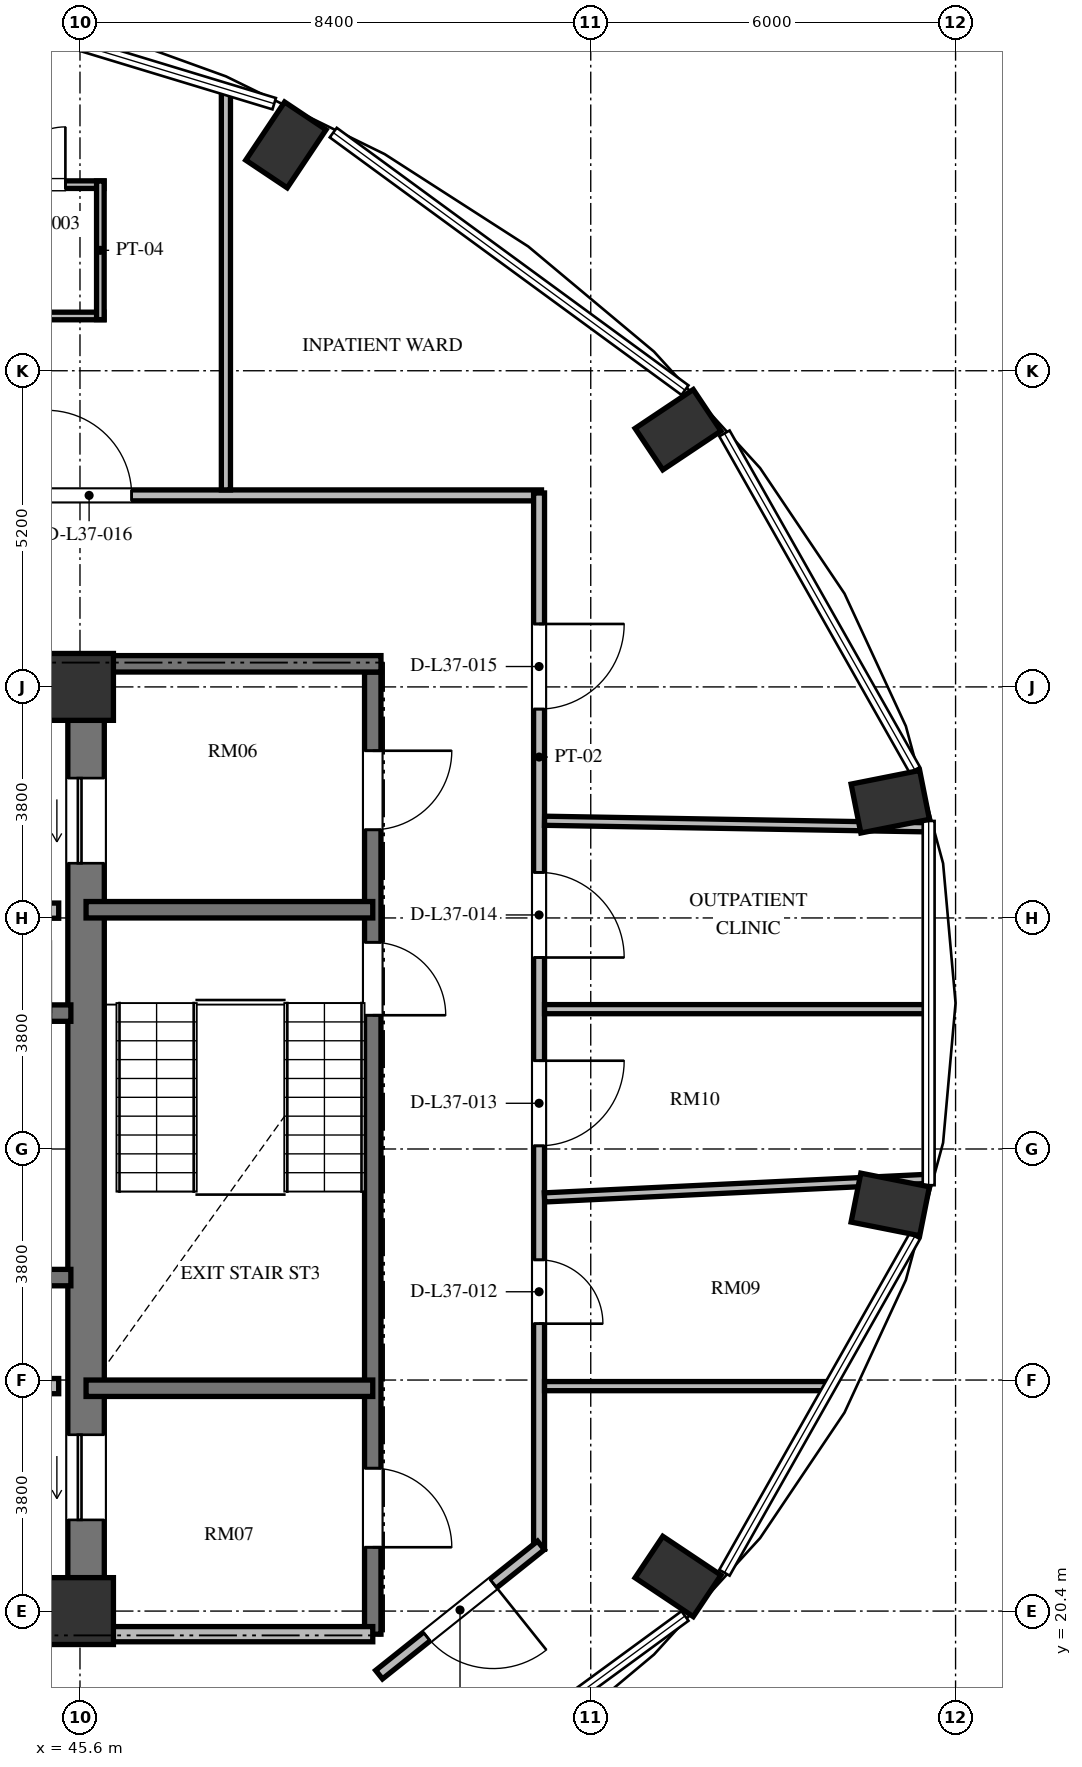
"""IFC4 building model, lengths in metres.
Left out: names, types, materials, properties, quantities, classifications, styles, units other than length and angle.
Written with IfcOpenShell. Run it as: python <this file> out.ifc"""

import sys

from ifc_helpers import new_model, si_unit, direction, frame, frame_2d, origin, origin_2d, place, context, subcontext, project, spatial, rectangle, extrude, element, fill, save


model = new_model("IFC4")
c1 = context("Model", 3, precision=1e-05, world=origin(), true_north=direction((0.0, 1.0)))
c2 = subcontext(c1, "Body", "Model", "MODEL_VIEW")
j1 = project(units=[si_unit("LENGTHUNIT", "METRE"), si_unit("PLANEANGLEUNIT", "RADIAN")], contexts=[c1])
p1 = place(None, origin())
s1 = spatial("IfcSite", under=j1, at=p1, CompositionType="ELEMENT")
p2 = place(p1, origin())
s2 = spatial("IfcBuilding", under=s1, at=p2, CompositionType="ELEMENT")
p3 = place(p2, frame((0.0, 0.0, 145.584)))
s3 = spatial("IfcBuildingStorey", under=s2, at=p3, CompositionType="ELEMENT", Elevation=145.584)
for number, where, z_axis, x_axis in (
    (1, (55.436, 20.969, 0.0), (0.0, 0.0, 1.0), (0.831, -0.556, 0.0)),
    (2, (58.926, 27.088, 0.0), (0.0, 0.0, 1.0), (0.981, -0.195, 0.0)),
    (3, (58.926, 33.712, 0.0), (0.0, 0.0, 1.0), (0.981, 0.195, 0.0)),
    (4, (55.436, 39.831, 0.0), (0.0, 0.0, 1.0), (0.831, 0.556, 0.0)),
    (5, (48.987, 44.514, 0.0), (0.0, 0.0, 1.0), (0.556, 0.831, 0.0)),
):
    element("IfcColumn", number, at=place(p3, frame(where, z_axis=z_axis, x_axis=x_axis)), inside=s3, PredefinedType="COLUMN", context=c2, shape_type="SweptSolid", body=[
        extrude(rectangle(XDim=1.15, YDim=0.82, at=origin_2d()), origin(), (0.0, 0.0, 1.0), 3.648),
    ])
for number, where, z_axis, x_axis in (
    (6, (45.6, 20.4, 0.0), (0.0, 0.0, 1.0), (1.0, 0.0, 0.0)),
    (7, (45.6, 35.6, 0.0), (0.0, 0.0, 1.0), (1.0, 0.0, 0.0)),
):
    element("IfcColumn", number, at=place(p3, frame(where, z_axis=z_axis, x_axis=x_axis)), inside=s3, PredefinedType="COLUMN", context=c2, shape_type="SweptSolid", body=[
        extrude(rectangle(XDim=1.1, YDim=1.1, at=origin_2d()), origin(), (0.0, 0.0, 1.0), 3.648),
    ])
p4 = place(p3, frame((45.7, 20.95, 0.0), z_axis=(0.0, 0.0, 1.0), x_axis=(0.0, 1.0, 0.0)))
e8 = element("IfcWall", 8, at=p4, inside=s3, PredefinedType="SHEAR", context=c2, shape_type="SweptSolid", body=[
    extrude(rectangle(XDim=14.1, YDim=0.6, at=frame_2d((7.05, 0.0))), origin(), (0.0, 0.0, 1.0), 3.648),
])
p5 = place(p4, frame((11.75, 0.0, 0.0)))
e9 = element("IfcOpeningElement", 9, at=p5, cuts=e8, PredefinedType="OPENING", context=c2, shape_type="SweptSolid", body=[
    extrude(rectangle(XDim=1.4, YDim=2.3, at=frame_2d((0.7, 1.15))), frame((0.0, 0.31, 0.0), z_axis=(0.0, -1.0, 0.0), x_axis=(1.0, 0.0, 0.0)), (0.0, 0.0, 1.0), 0.62),
])
p6 = place(p4, frame((0.95, 0.0, 0.0)))
e10 = element("IfcOpeningElement", 10, at=p6, cuts=e8, PredefinedType="OPENING", context=c2, shape_type="SweptSolid", body=[
    extrude(rectangle(XDim=1.4, YDim=2.3, at=frame_2d((0.7, 1.15))), frame((0.0, 0.31, 0.0), z_axis=(0.0, -1.0, 0.0), x_axis=(1.0, 0.0, 0.0)), (0.0, 0.0, 1.0), 0.62),
])
p7 = place(p3, frame((37.465, 30.235, 0.0), z_axis=(0.0, 0.0, 1.0), x_axis=(1.0, 0.0, 0.0)))
e11 = element("IfcWall", 11, at=p7, inside=s3, PredefinedType="SHEAR", context=c2, shape_type="SweptSolid", body=[
    extrude(rectangle(XDim=7.985, YDim=0.27, at=frame_2d((3.992, 0.0))), origin(), (0.0, 0.0, 1.0), 3.648),
])
p8 = place(p7, frame((6.455, 0.0, 0.0)))
e12 = element("IfcOpeningElement", 12, at=p8, cuts=e11, PredefinedType="OPENING", context=c2, shape_type="SweptSolid", body=[
    extrude(rectangle(XDim=1.2, YDim=2.15, at=frame_2d((0.6, 1.075))), frame((0.0, 0.145, 0.0), z_axis=(0.0, -1.0, 0.0), x_axis=(1.0, 0.0, 0.0)), (0.0, 0.0, 1.0), 0.29),
])
p9 = place(p3, frame((37.465, 25.885, 0.0), z_axis=(0.0, 0.0, 1.0), x_axis=(1.0, 0.0, 0.0)))
e13 = element("IfcWall", 13, at=p9, inside=s3, PredefinedType="SHEAR", context=c2, shape_type="SweptSolid", body=[
    extrude(rectangle(XDim=7.985, YDim=0.27, at=frame_2d((3.992, 0.0))), origin(), (0.0, 0.0, 1.0), 3.648),
])
for number, where, z_axis, x_axis in (
    (14, (42.95, 31.92, 0.0), (0.0, 0.0, 1.0), (1.0, 0.0, 0.0)),
    (15, (42.95, 24.1, 0.0), (0.0, 0.0, 1.0), (1.0, 0.0, 0.0)),
):
    element("IfcWall", number, at=place(p3, frame(where, z_axis=z_axis, x_axis=x_axis)), inside=s3, PredefinedType="SOLIDWALL", context=c2, shape_type="SweptSolid", body=[
        extrude(rectangle(XDim=2.3, YDim=0.25, at=frame_2d((1.15, 0.0))), origin(), (0.0, 0.0, 1.0), 3.428),
    ])
p10 = place(p3, frame((50.415, 35.845, 0.0), z_axis=(0.0, 0.0, 1.0), x_axis=(0.0, -1.0, 0.0)))
e16 = element("IfcWall", 16, at=p10, inside=s3, PredefinedType="SHEAR", context=c2, shape_type="SweptSolid", body=[
    extrude(rectangle(XDim=15.825, YDim=0.27, at=frame_2d((7.913, 0.0))), origin(), (0.0, 0.0, 1.0), 3.648),
])
p11 = place(p10, frame((4.445, 0.0, 0.0)))
e17 = element("IfcOpeningElement", 17, at=p11, cuts=e16, PredefinedType="OPENING", context=c2, shape_type="SweptSolid", body=[
    extrude(rectangle(XDim=1.2, YDim=2.15, at=frame_2d((0.6, 1.075))), frame((0.0, 0.145, 0.0), z_axis=(0.0, -1.0, 0.0), x_axis=(1.0, 0.0, 0.0)), (0.0, 0.0, 1.0), 0.29),
])
p12 = place(p10, frame((1.295, 0.0, 0.0)))
e18 = element("IfcOpeningElement", 18, at=p12, cuts=e16, PredefinedType="OPENING", context=c2, shape_type="SweptSolid", body=[
    extrude(rectangle(XDim=1.3, YDim=2.2, at=frame_2d((0.65, 1.1))), frame((0.0, 0.145, 0.0), z_axis=(0.0, -1.0, 0.0), x_axis=(1.0, 0.0, 0.0)), (0.0, 0.0, 1.0), 0.29),
])
p13 = place(p10, frame((13.095, 0.0, 0.0)))
e19 = element("IfcOpeningElement", 19, at=p13, cuts=e16, PredefinedType="OPENING", context=c2, shape_type="SweptSolid", body=[
    extrude(rectangle(XDim=1.3, YDim=2.2, at=frame_2d((0.65, 1.1))), frame((0.0, 0.145, 0.0), z_axis=(0.0, -1.0, 0.0), x_axis=(1.0, 0.0, 0.0)), (0.0, 0.0, 1.0), 0.29),
])
p14 = place(p3, frame((46.0, 35.98, 0.0), z_axis=(0.0, 0.0, 1.0), x_axis=(1.0, 0.0, 0.0)))
e20 = element("IfcWall", 20, at=p14, inside=s3, PredefinedType="SHEAR", context=c2, shape_type="SweptSolid", body=[
    extrude(rectangle(XDim=4.55, YDim=0.27, at=frame_2d((2.275, 0.0))), origin(), (0.0, 0.0, 1.0), 3.648),
])
for number, where, z_axis, x_axis in (
    (21, (45.7, 31.935, 0.0), (0.0, 0.0, 1.0), (1.0, 0.0, 0.0)),
    (22, (45.7, 24.065, 0.0), (0.0, 0.0, 1.0), (1.0, 0.0, 0.0)),
):
    element("IfcWall", number, at=place(p3, frame(where, z_axis=z_axis, x_axis=x_axis)), inside=s3, PredefinedType="SHEAR", context=c2, shape_type="SweptSolid", body=[
        extrude(rectangle(XDim=4.715, YDim=0.27, at=frame_2d((2.357, 0.0))), origin(), (0.0, 0.0, 1.0), 3.648),
    ])
p15 = place(p3, frame((45.7, 20.02, 0.0), z_axis=(0.0, 0.0, 1.0), x_axis=(1.0, 0.0, 0.0)))
e23 = element("IfcWall", 23, at=p15, inside=s3, PredefinedType="SOLIDWALL", context=c2, shape_type="SweptSolid", body=[
    extrude(rectangle(XDim=4.715, YDim=0.25, at=frame_2d((2.357, 0.0))), origin(), (0.0, 0.0, 1.0), 3.428),
])
p16 = place(p3, frame((39.46, 38.75, 0.0), z_axis=(0.0, 0.0, 1.0), x_axis=(1.0, 0.0, 0.0)))
e24 = element("IfcWall", 24, at=p16, inside=s3, PredefinedType="PARTITIONING", context=c2, shape_type="SweptSolid", body=[
    extrude(rectangle(XDim=13.73, YDim=0.18, at=frame_2d((6.865, 0.0))), origin(), (0.0, 0.0, 1.0), 3.428),
])
p17 = place(p16, frame((5.59, 0.0, 0.0)))
e25 = element("IfcOpeningElement", 25, at=p17, cuts=e24, PredefinedType="OPENING", context=c2, shape_type="SweptSolid", body=[
    extrude(rectangle(XDim=1.4, YDim=2.2, at=frame_2d((0.7, 1.1))), frame((0.0, 0.1, 0.0), z_axis=(0.0, -1.0, 0.0), x_axis=(1.0, 0.0, 0.0)), (0.0, 0.0, 1.0), 0.2),
])
p18 = place(p3, frame((53.15, 38.79, 0.0), z_axis=(0.0, 0.0, 1.0), x_axis=(0.0, -1.0, 0.0)))
e26 = element("IfcWall", 26, at=p18, inside=s3, PredefinedType="PARTITIONING", context=c2, shape_type="SweptSolid", body=[
    extrude(rectangle(XDim=17.374, YDim=0.18, at=frame_2d((8.687, 0.0))), origin(), (0.0, 0.0, 1.0), 3.428),
])
p19 = place(p18, frame((12.613, 0.0, 0.0)))
e27 = element("IfcOpeningElement", 27, at=p19, cuts=e26, PredefinedType="OPENING", context=c2, shape_type="SweptSolid", body=[
    extrude(rectangle(XDim=1.05, YDim=2.15, at=frame_2d((0.525, 1.075))), frame((0.0, 0.1, 0.0), z_axis=(0.0, -1.0, 0.0), x_axis=(1.0, 0.0, 0.0)), (0.0, 0.0, 1.0), 0.2),
])
p20 = place(p18, frame((9.338, 0.0, 0.0)))
e28 = element("IfcOpeningElement", 28, at=p20, cuts=e26, PredefinedType="OPENING", context=c2, shape_type="SweptSolid", body=[
    extrude(rectangle(XDim=1.4, YDim=2.2, at=frame_2d((0.7, 1.1))), frame((0.0, 0.1, 0.0), z_axis=(0.0, -1.0, 0.0), x_axis=(1.0, 0.0, 0.0)), (0.0, 0.0, 1.0), 0.2),
])
p21 = place(p18, frame((6.241, 0.0, 0.0)))
e29 = element("IfcOpeningElement", 29, at=p21, cuts=e26, PredefinedType="OPENING", context=c2, shape_type="SweptSolid", body=[
    extrude(rectangle(XDim=1.4, YDim=2.2, at=frame_2d((0.7, 1.1))), frame((0.0, 0.1, 0.0), z_axis=(0.0, -1.0, 0.0), x_axis=(1.0, 0.0, 0.0)), (0.0, 0.0, 1.0), 0.2),
])
p22 = place(p18, frame((2.155, 0.0, 0.0)))
e30 = element("IfcOpeningElement", 30, at=p22, cuts=e26, PredefinedType="OPENING", context=c2, shape_type="SweptSolid", body=[
    extrude(rectangle(XDim=1.4, YDim=2.2, at=frame_2d((0.7, 1.1))), frame((0.0, 0.1, 0.0), z_axis=(0.0, -1.0, 0.0), x_axis=(1.0, 0.0, 0.0)), (0.0, 0.0, 1.0), 0.2),
])
p23 = place(p3, frame((53.181, 21.481, 0.0), z_axis=(0.0, 0.0, 1.0), x_axis=(-0.781420737726, -0.624004511724, 0.0)))
e31 = element("IfcWall", 31, at=p23, inside=s3, PredefinedType="PARTITIONING", context=c2, shape_type="SweptSolid", body=[
    extrude(rectangle(XDim=3.407, YDim=0.18, at=frame_2d((1.704, 0.0))), origin(), (0.0, 0.0, 1.0), 3.428),
])
p24 = place(p23, frame((1.004, 0.0, 0.0)))
e32 = element("IfcOpeningElement", 32, at=p24, cuts=e31, PredefinedType="OPENING", context=c2, shape_type="SweptSolid", body=[
    extrude(rectangle(XDim=1.4, YDim=2.2, at=frame_2d((0.7, 1.1))), frame((0.0, 0.1, 0.0), z_axis=(0.0, -1.0, 0.0), x_axis=(1.0, 0.0, 0.0)), (0.0, 0.0, 1.0), 0.2),
])
p25 = place(p3, frame((53.24, 24.1, 0.0), z_axis=(0.0, 0.0, 1.0), x_axis=(1.0, 0.0, 0.0)))
e33 = element("IfcWall", 33, at=p25, inside=s3, PredefinedType="PARTITIONING", context=c2, shape_type="SweptSolid", body=[
    extrude(rectangle(XDim=4.687, YDim=0.15, at=frame_2d((2.343, 0.0))), origin(), (0.0, 0.0, 1.0), 3.428),
])
p26 = place(p3, frame((53.24, 27.204, 0.0), z_axis=(0.0, 0.0, 1.0), x_axis=(0.99882763896, 0.0484081362, 0.0)))
e34 = element("IfcWall", 34, at=p26, inside=s3, PredefinedType="PARTITIONING", context=c2, shape_type="SweptSolid", body=[
    extrude(rectangle(XDim=6.329, YDim=0.15, at=frame_2d((3.165, 0.0))), origin(), (0.0, 0.0, 1.0), 3.428),
])
p27 = place(p3, frame((53.24, 30.3, 0.0), z_axis=(0.0, 0.0, 1.0), x_axis=(1.0, 0.0, 0.0)))
e35 = element("IfcWall", 35, at=p27, inside=s3, PredefinedType="PARTITIONING", context=c2, shape_type="SweptSolid", body=[
    extrude(rectangle(XDim=6.307, YDim=0.15, at=frame_2d((3.154, 0.0))), origin(), (0.0, 0.0, 1.0), 3.428),
])
p28 = place(p3, frame((53.24, 33.399, 0.0), z_axis=(0.0, 0.0, 1.0), x_axis=(0.999852374284, -0.017182247791, 0.0)))
e36 = element("IfcWall", 36, at=p28, inside=s3, PredefinedType="PARTITIONING", context=c2, shape_type="SweptSolid", body=[
    extrude(rectangle(XDim=6.323, YDim=0.15, at=frame_2d((3.162, 0.0))), origin(), (0.0, 0.0, 1.0), 3.428),
])
p29 = place(p3, frame((48.0, 38.84, 0.0), z_axis=(0.0, 0.0, 1.0), x_axis=(0.0, 1.0, 0.0)))
e37 = element("IfcWall", 37, at=p29, inside=s3, PredefinedType="PARTITIONING", context=c2, shape_type="SweptSolid", body=[
    extrude(rectangle(XDim=6.578, YDim=0.15, at=frame_2d((3.289, 0.0))), origin(), (0.0, 0.0, 1.0), 3.428),
])
p30 = place(p3, frame((43.775, 43.861, 0.0), z_axis=(0.0, 0.0, 1.0), x_axis=(1.0, 0.0, 0.0)))
e38 = element("IfcWall", 38, at=p30, inside=s3, PredefinedType="PARTITIONING", context=c2, shape_type="SweptSolid", body=[
    extrude(rectangle(XDim=2.22, YDim=0.125, at=frame_2d((1.11, 0.0))), origin(), (0.0, 0.0, 1.0), 3.428),
])
p31 = place(p30, frame((0.635, 0.0, 0.0)))
e39 = element("IfcOpeningElement", 39, at=p31, cuts=e38, PredefinedType="OPENING", context=c2, shape_type="SweptSolid", body=[
    extrude(rectangle(XDim=0.95, YDim=2.1, at=frame_2d((0.475, 1.05))), frame((0.0, 0.073, 0.0), z_axis=(0.0, -1.0, 0.0), x_axis=(1.0, 0.0, 0.0)), (0.0, 0.0, 1.0), 0.145),
])
p32 = place(p3, frame((43.775, 41.701, 0.0), z_axis=(0.0, 0.0, 1.0), x_axis=(1.0, 0.0, 0.0)))
e40 = element("IfcWall", 40, at=p32, inside=s3, PredefinedType="PARTITIONING", context=c2, shape_type="SweptSolid", body=[
    extrude(rectangle(XDim=2.22, YDim=0.125, at=frame_2d((1.11, 0.0))), origin(), (0.0, 0.0, 1.0), 3.428),
])
p33 = place(p3, frame((45.935, 41.641, 0.0), z_axis=(0.0, 0.0, 1.0), x_axis=(0.0, 1.0, 0.0)))
e41 = element("IfcWall", 41, at=p33, inside=s3, PredefinedType="PARTITIONING", context=c2, shape_type="SweptSolid", body=[
    extrude(rectangle(XDim=2.28, YDim=0.125, at=frame_2d((1.14, 0.0))), origin(), (0.0, 0.0, 1.0), 3.428),
])
p34 = place(p5, origin())
e42 = element("IfcDoor", 42, at=p34, inside=s3, OperationType="SLIDING_TO_LEFT", PredefinedType="DOOR", context=c2, shape_type="SweptSolid", body=[
    extrude(rectangle(XDim=1.4, YDim=2.3, at=frame_2d((0.7, 1.15))), frame((0.0, 0.025, 0.0), z_axis=(0.0, -1.0, 0.0), x_axis=(1.0, 0.0, 0.0)), (0.0, 0.0, 1.0), 0.05),
])
fill(e9, e42)
p35 = place(p6, origin())
e43 = element("IfcDoor", 43, at=p35, inside=s3, OperationType="SLIDING_TO_LEFT", PredefinedType="DOOR", context=c2, shape_type="SweptSolid", body=[
    extrude(rectangle(XDim=1.4, YDim=2.3, at=frame_2d((0.7, 1.15))), frame((0.0, 0.025, 0.0), z_axis=(0.0, -1.0, 0.0), x_axis=(1.0, 0.0, 0.0)), (0.0, 0.0, 1.0), 0.05),
])
fill(e10, e43)
p36 = place(p11, origin())
e44 = element("IfcDoor", 44, at=p36, inside=s3, OperationType="SINGLE_SWING_RIGHT", PredefinedType="DOOR", context=c2, shape_type="SweptSolid", body=[
    extrude(rectangle(XDim=1.2, YDim=2.15, at=frame_2d((0.6, 1.075))), frame((0.0, 0.025, 0.0), z_axis=(0.0, -1.0, 0.0), x_axis=(1.0, 0.0, 0.0)), (0.0, 0.0, 1.0), 0.05),
])
fill(e17, e44)
p37 = place(p12, origin())
e45 = element("IfcDoor", 45, at=p37, inside=s3, OperationType="SINGLE_SWING_LEFT", PredefinedType="DOOR", context=c2, shape_type="SweptSolid", body=[
    extrude(rectangle(XDim=1.3, YDim=2.2, at=frame_2d((0.65, 1.1))), frame((0.0, 0.025, 0.0), z_axis=(0.0, -1.0, 0.0), x_axis=(1.0, 0.0, 0.0)), (0.0, 0.0, 1.0), 0.05),
])
fill(e18, e45)
p38 = place(p13, origin())
e46 = element("IfcDoor", 46, at=p38, inside=s3, OperationType="SINGLE_SWING_RIGHT", PredefinedType="DOOR", context=c2, shape_type="SweptSolid", body=[
    extrude(rectangle(XDim=1.3, YDim=2.2, at=frame_2d((0.65, 1.1))), frame((0.0, 0.025, 0.0), z_axis=(0.0, -1.0, 0.0), x_axis=(1.0, 0.0, 0.0)), (0.0, 0.0, 1.0), 0.05),
])
fill(e19, e46)
p39 = place(p24, origin())
e47 = element("IfcDoor", 47, at=p39, inside=s3, OperationType="SINGLE_SWING_LEFT", PredefinedType="DOOR", context=c2, shape_type="SweptSolid", body=[
    extrude(rectangle(XDim=1.4, YDim=2.2, at=frame_2d((0.7, 1.1))), frame((0.0, 0.025, 0.0), z_axis=(0.0, -1.0, 0.0), x_axis=(1.0, 0.0, 0.0)), (0.0, 0.0, 1.0), 0.05),
])
fill(e32, e47)
p40 = place(p19, origin())
e48 = element("IfcDoor", 48, at=p40, inside=s3, OperationType="SINGLE_SWING_RIGHT", PredefinedType="DOOR", context=c2, shape_type="SweptSolid", body=[
    extrude(rectangle(XDim=1.05, YDim=2.15, at=frame_2d((0.525, 1.075))), frame((0.0, 0.025, 0.0), z_axis=(0.0, -1.0, 0.0), x_axis=(1.0, 0.0, 0.0)), (0.0, 0.0, 1.0), 0.05),
])
fill(e27, e48)
p41 = place(p20, origin())
e49 = element("IfcDoor", 49, at=p41, inside=s3, OperationType="SINGLE_SWING_LEFT", PredefinedType="DOOR", context=c2, shape_type="SweptSolid", body=[
    extrude(rectangle(XDim=1.4, YDim=2.2, at=frame_2d((0.7, 1.1))), frame((0.0, 0.025, 0.0), z_axis=(0.0, -1.0, 0.0), x_axis=(1.0, 0.0, 0.0)), (0.0, 0.0, 1.0), 0.05),
])
fill(e28, e49)
p42 = place(p21, origin())
e50 = element("IfcDoor", 50, at=p42, inside=s3, OperationType="SINGLE_SWING_RIGHT", PredefinedType="DOOR", context=c2, shape_type="SweptSolid", body=[
    extrude(rectangle(XDim=1.4, YDim=2.2, at=frame_2d((0.7, 1.1))), frame((0.0, 0.025, 0.0), z_axis=(0.0, -1.0, 0.0), x_axis=(1.0, 0.0, 0.0)), (0.0, 0.0, 1.0), 0.05),
])
fill(e29, e50)
p43 = place(p22, origin())
e51 = element("IfcDoor", 51, at=p43, inside=s3, OperationType="SINGLE_SWING_LEFT", PredefinedType="DOOR", context=c2, shape_type="SweptSolid", body=[
    extrude(rectangle(XDim=1.4, YDim=2.2, at=frame_2d((0.7, 1.1))), frame((0.0, 0.025, 0.0), z_axis=(0.0, -1.0, 0.0), x_axis=(1.0, 0.0, 0.0)), (0.0, 0.0, 1.0), 0.05),
])
fill(e30, e51)
p44 = place(p31, origin())
e52 = element("IfcDoor", 52, at=p44, inside=s3, OperationType="SINGLE_SWING_RIGHT", PredefinedType="DOOR", context=c2, shape_type="SweptSolid", body=[
    extrude(rectangle(XDim=0.95, YDim=2.1, at=frame_2d((0.475, 1.05))), frame((0.0, 0.025, 0.0), z_axis=(0.0, -1.0, 0.0), x_axis=(1.0, 0.0, 0.0)), (0.0, 0.0, 1.0), 0.05),
])
fill(e39, e52)
p45 = place(p17, origin())
e53 = element("IfcDoor", 53, at=p45, inside=s3, OperationType="SINGLE_SWING_LEFT", PredefinedType="DOOR", context=c2, shape_type="SweptSolid", body=[
    extrude(rectangle(XDim=1.4, YDim=2.2, at=frame_2d((0.7, 1.1))), frame((0.0, 0.025, 0.0), z_axis=(0.0, -1.0, 0.0), x_axis=(1.0, 0.0, 0.0)), (0.0, 0.0, 1.0), 0.05),
])
fill(e25, e53)
save(model, sys.argv[1])
